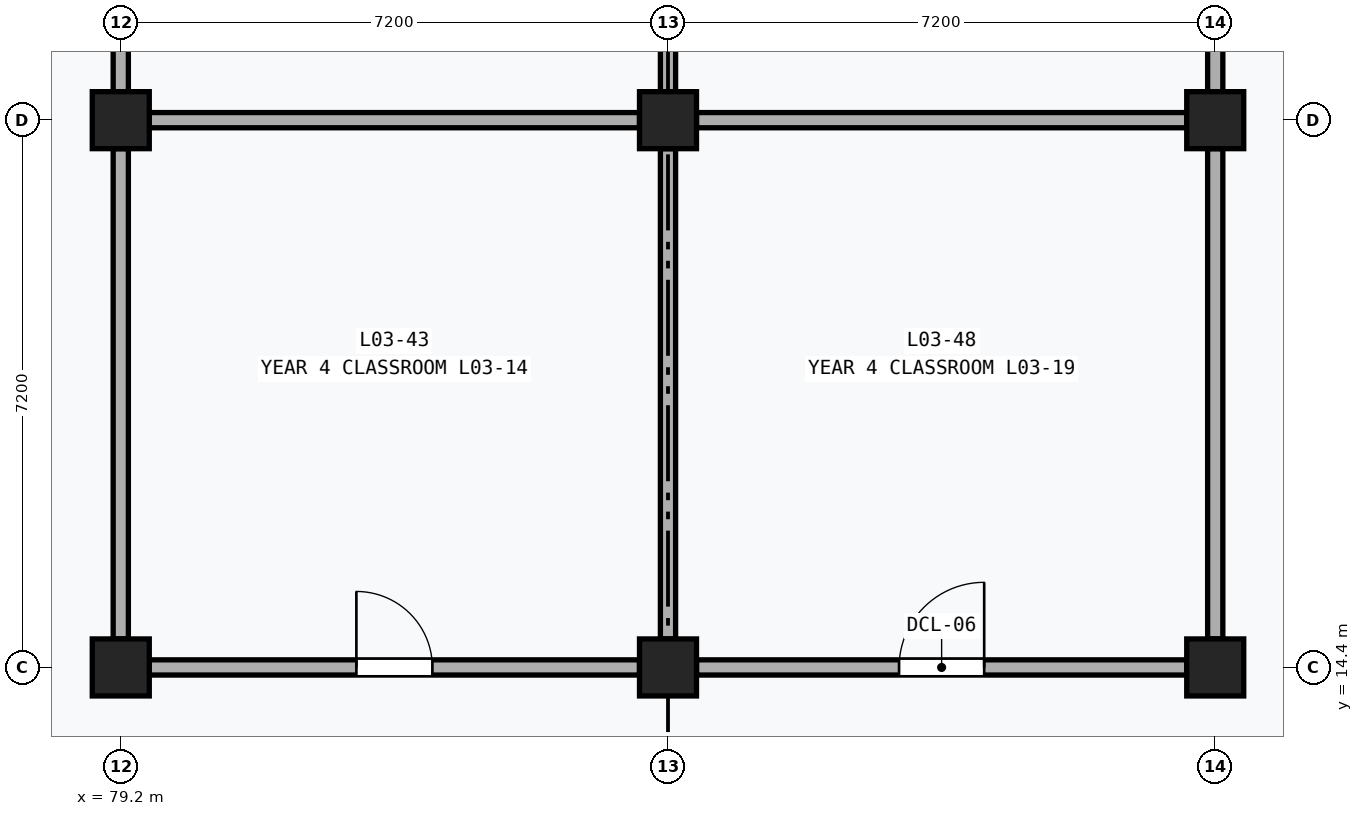
"""IFC4 building model, lengths in metres.
Left out: names, types, materials, properties, quantities, classifications, styles, units other than length and angle.
Written with IfcOpenShell. Run it as: python <this file> out.ifc"""

import sys

from ifc_helpers import new_model, si_unit, direction, frame, frame_2d, origin, origin_2d, place, context, subcontext, project, spatial, rectangle, extrude, element, fill, save


model = new_model("IFC4")
c1 = context("Model", 3, precision=1e-05, world=origin(), true_north=direction((0.0, 1.0)))
c2 = subcontext(c1, "Body", "Model", "MODEL_VIEW")
j1 = project(units=[si_unit("LENGTHUNIT", "METRE"), si_unit("PLANEANGLEUNIT", "RADIAN")], contexts=[c1])
p1 = place(None, origin())
s1 = spatial("IfcSite", under=j1, at=p1, CompositionType="ELEMENT")
p2 = place(p1, origin())
s2 = spatial("IfcBuilding", under=s1, at=p2, CompositionType="ELEMENT")
p3 = place(p2, frame((0.0, 0.0, 14.4)))
s3 = spatial("IfcBuildingStorey", under=s2, at=p3, CompositionType="ELEMENT", Elevation=14.4)
for number, where, z_axis, x_axis in (
    (1, (79.2, 14.4, 0.0), (0.0, 0.0, 1.0), (1.0, 0.0, 0.0)),
    (2, (79.2, 21.6, 0.0), (0.0, 0.0, 1.0), (1.0, 0.0, 0.0)),
    (3, (86.4, 14.4, 0.0), (0.0, 0.0, 1.0), (1.0, 0.0, 0.0)),
    (4, (86.4, 21.6, 0.0), (0.0, 0.0, 1.0), (1.0, 0.0, 0.0)),
    (5, (93.6, 14.4, 0.0), (0.0, 0.0, 1.0), (1.0, 0.0, 0.0)),
    (6, (93.6, 21.6, 0.0), (0.0, 0.0, 1.0), (1.0, 0.0, 0.0)),
):
    element("IfcColumn", number, at=place(p3, frame(where, z_axis=z_axis, x_axis=x_axis)), inside=s3, PredefinedType="COLUMN", context=c2, shape_type="SweptSolid", body=[
        extrude(rectangle(XDim=0.75, YDim=0.75, at=origin_2d()), origin(), (0.0, 0.0, 1.0), 4.2),
    ])
p4 = place(p3, frame((79.575, 14.4, 0.0), z_axis=(0.0, 0.0, 1.0), x_axis=(1.0, 0.0, 0.0)))
e7 = element("IfcWall", 7, at=p4, inside=s3, PredefinedType="PARTITIONING", context=c2, shape_type="SweptSolid", body=[
    extrude(rectangle(XDim=6.45, YDim=0.2, at=frame_2d((3.225, 0.0))), origin(), (0.0, 0.0, 1.0), 3.17),
])
p5 = place(p4, frame((2.725, 0.0, 0.0)))
e8 = element("IfcOpeningElement", 8, at=p5, cuts=e7, PredefinedType="OPENING", context=c2, shape_type="SweptSolid", body=[
    extrude(rectangle(XDim=1.0, YDim=2.1, at=frame_2d((0.5, 1.05))), frame((0.0, 0.112, 0.0), z_axis=(0.0, -1.0, 0.0), x_axis=(1.0, 0.0, 0.0)), (0.0, 0.0, 1.0), 0.224),
])
p6 = place(p3, frame((79.575, 21.6, 0.0), z_axis=(0.0, 0.0, 1.0), x_axis=(1.0, 0.0, 0.0)))
e9 = element("IfcWall", 9, at=p6, inside=s3, PredefinedType="PARTITIONING", context=c2, shape_type="SweptSolid", body=[
    extrude(rectangle(XDim=6.45, YDim=0.2, at=frame_2d((3.225, 0.0))), origin(), (0.0, 0.0, 1.0), 3.17),
])
for number, where, z_axis, x_axis in (
    (10, (79.2, 14.775, 0.0), (0.0, 0.0, 1.0), (0.0, 1.0, 0.0)),
    (11, (86.4, 14.775, 0.0), (0.0, 0.0, 1.0), (0.0, 1.0, 0.0)),
):
    element("IfcWall", number, at=place(p3, frame(where, z_axis=z_axis, x_axis=x_axis)), inside=s3, PredefinedType="PARTITIONING", context=c2, shape_type="SweptSolid", body=[
        extrude(rectangle(XDim=6.45, YDim=0.2, at=frame_2d((3.225, 0.0))), origin(), (0.0, 0.0, 1.0), 3.17),
    ])
p7 = place(p3, frame((79.2, 21.975, 0.0), z_axis=(0.0, 0.0, 1.0), x_axis=(0.0, 1.0, 0.0)))
e12 = element("IfcWall", 12, at=p7, inside=s3, PredefinedType="PARTITIONING", context=c2, shape_type="SweptSolid", body=[
    extrude(rectangle(XDim=6.45, YDim=0.2, at=frame_2d((3.225, 0.0))), origin(), (0.0, 0.0, 1.0), 3.17),
])
p8 = place(p7, frame((2.715, 0.0, 0.0)))
e13 = element("IfcOpeningElement", 13, at=p8, cuts=e12, PredefinedType="OPENING", context=c2, shape_type="SweptSolid", body=[
    extrude(rectangle(XDim=1.02, YDim=2.12, at=frame_2d((0.51, 1.06))), frame((0.0, 0.112, 0.0), z_axis=(0.0, -1.0, 0.0), x_axis=(1.0, 0.0, 0.0)), (0.0, 0.0, 1.0), 0.224),
])
p9 = place(p3, frame((86.4, 21.975, 0.0), z_axis=(0.0, 0.0, 1.0), x_axis=(0.0, 1.0, 0.0)))
e14 = element("IfcWall", 14, at=p9, inside=s3, PredefinedType="PARTITIONING", context=c2, shape_type="SweptSolid", body=[
    extrude(rectangle(XDim=6.45, YDim=0.2, at=frame_2d((3.225, 0.0))), origin(), (0.0, 0.0, 1.0), 3.17),
])
p10 = place(p3, frame((86.775, 14.4, 0.0), z_axis=(0.0, 0.0, 1.0), x_axis=(1.0, 0.0, 0.0)))
e15 = element("IfcWall", 15, at=p10, inside=s3, PredefinedType="PARTITIONING", context=c2, shape_type="SweptSolid", body=[
    extrude(rectangle(XDim=6.45, YDim=0.2, at=frame_2d((3.225, 0.0))), origin(), (0.0, 0.0, 1.0), 3.17),
])
p11 = place(p10, frame((2.665, 0.0, 0.0)))
e16 = element("IfcOpeningElement", 16, at=p11, cuts=e15, PredefinedType="OPENING", context=c2, shape_type="SweptSolid", body=[
    extrude(rectangle(XDim=1.12, YDim=2.2, at=frame_2d((0.56, 1.1))), frame((0.0, 0.112, 0.0), z_axis=(0.0, -1.0, 0.0), x_axis=(1.0, 0.0, 0.0)), (0.0, 0.0, 1.0), 0.224),
])
for number, where, z_axis, x_axis in (
    (17, (86.775, 21.6, 0.0), (0.0, 0.0, 1.0), (1.0, 0.0, 0.0)),
    (18, (93.6, 14.775, 0.0), (0.0, 0.0, 1.0), (0.0, 1.0, 0.0)),
):
    element("IfcWall", number, at=place(p3, frame(where, z_axis=z_axis, x_axis=x_axis)), inside=s3, PredefinedType="PARTITIONING", context=c2, shape_type="SweptSolid", body=[
        extrude(rectangle(XDim=6.45, YDim=0.2, at=frame_2d((3.225, 0.0))), origin(), (0.0, 0.0, 1.0), 3.17),
    ])
p12 = place(p3, frame((93.6, 21.975, 0.0), z_axis=(0.0, 0.0, 1.0), x_axis=(0.0, 1.0, 0.0)))
e19 = element("IfcWall", 19, at=p12, inside=s3, PredefinedType="PARTITIONING", context=c2, shape_type="SweptSolid", body=[
    extrude(rectangle(XDim=6.45, YDim=0.2, at=frame_2d((3.225, 0.0))), origin(), (0.0, 0.0, 1.0), 3.17),
])
p13 = place(p12, frame((2.645, 0.0, 0.0)))
e20 = element("IfcOpeningElement", 20, at=p13, cuts=e19, PredefinedType="OPENING", context=c2, shape_type="SweptSolid", body=[
    extrude(rectangle(XDim=1.16, YDim=2.22, at=frame_2d((0.58, 1.11))), frame((0.0, 0.112, 0.0), z_axis=(0.0, -1.0, 0.0), x_axis=(1.0, 0.0, 0.0)), (0.0, 0.0, 1.0), 0.224),
])
p14 = place(p5, origin())
e21 = element("IfcDoor", 21, at=p14, inside=s3, OperationType="SINGLE_SWING_LEFT", PredefinedType="DOOR", context=c2, shape_type="SweptSolid", body=[
    extrude(rectangle(XDim=1.0, YDim=2.1, at=frame_2d((0.5, 1.05))), frame((0.0, 0.025, 0.0), z_axis=(0.0, -1.0, 0.0), x_axis=(1.0, 0.0, 0.0)), (0.0, 0.0, 1.0), 0.05),
])
fill(e8, e21)
p15 = place(p11, origin())
e22 = element("IfcDoor", 22, at=p15, inside=s3, OperationType="SINGLE_SWING_RIGHT", PredefinedType="DOOR", context=c2, shape_type="SweptSolid", body=[
    extrude(rectangle(XDim=1.12, YDim=2.2, at=frame_2d((0.56, 1.1))), frame((0.0, 0.025, 0.0), z_axis=(0.0, -1.0, 0.0), x_axis=(1.0, 0.0, 0.0)), (0.0, 0.0, 1.0), 0.05),
])
fill(e16, e22)
save(model, sys.argv[1])
